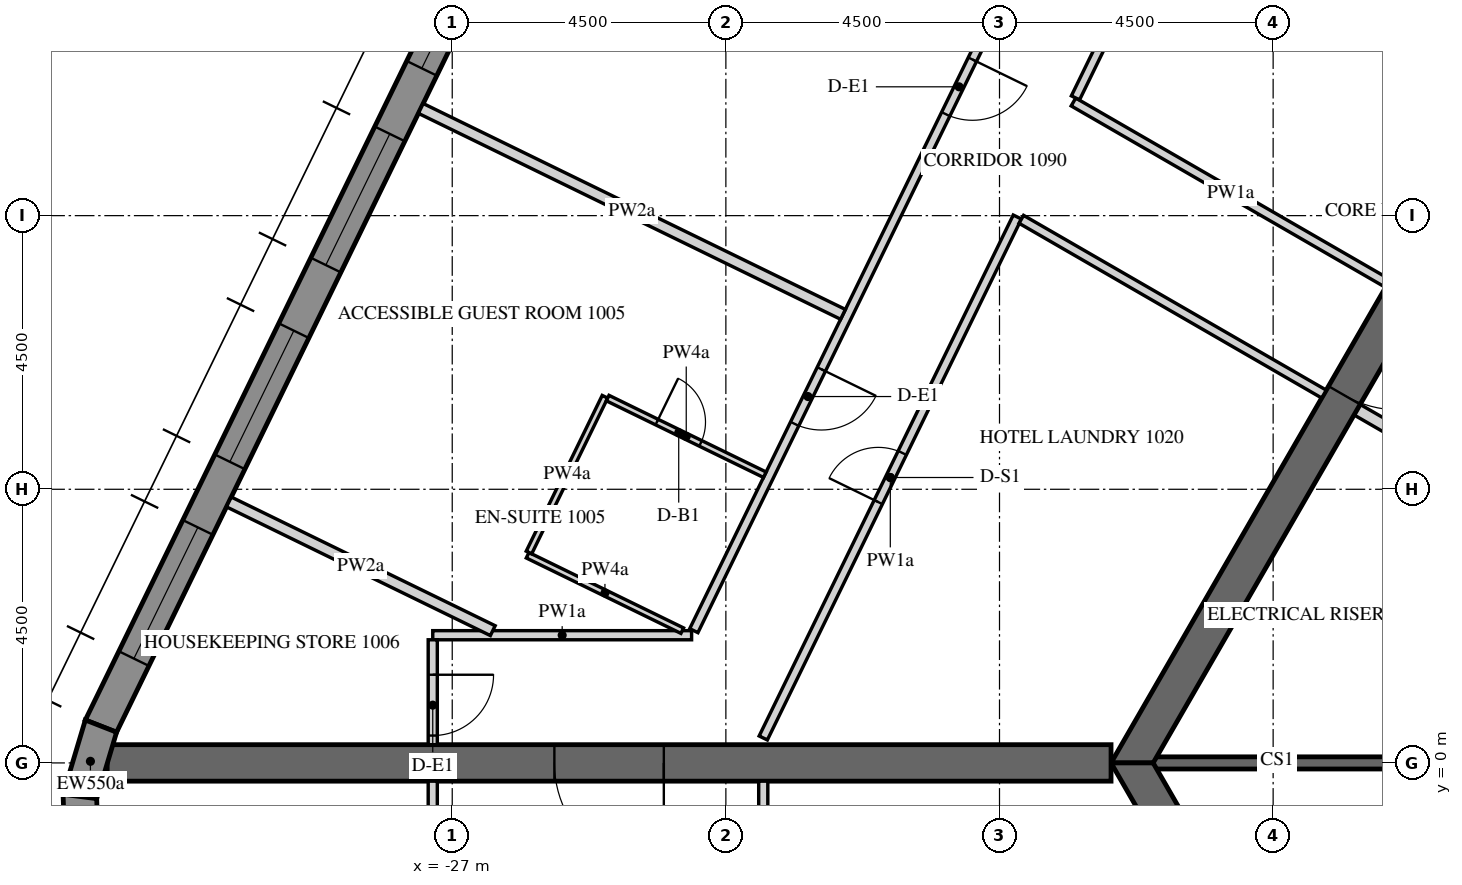
"""IFC4 building model, lengths in metres.
Left out: names, types, materials, properties, quantities, classifications, styles, units other than length and angle.
Written with IfcOpenShell. Run it as: python <this file> out.ifc"""

import sys

from ifc_helpers import new_model, si_unit, direction, frame, frame_2d, origin, place, context, subcontext, project, spatial, polyline, rectangle, outline, extrude, element, fill, save


model = new_model("IFC4")
c1 = context("Model", 3, precision=1e-05, world=origin(), true_north=direction((0.0, 1.0)))
c2 = subcontext(c1, "Body", "Model", "MODEL_VIEW")
j1 = project(units=[si_unit("LENGTHUNIT", "METRE"), si_unit("PLANEANGLEUNIT", "RADIAN")], contexts=[c1])
p1 = place(None, origin())
s1 = spatial("IfcSite", under=j1, at=p1, CompositionType="ELEMENT")
p2 = place(p1, origin())
s2 = spatial("IfcBuilding", under=s1, at=p2, CompositionType="ELEMENT")
p3 = place(p2, frame((0.0, 0.0, 142.8)))
s3 = spatial("IfcBuildingStorey", under=s2, at=p3, CompositionType="ELEMENT", Elevation=142.8)
p4 = place(p3, frame((-19.595, 27.633, -0.15), z_axis=(0.0, 0.0, 1.0), x_axis=(-0.438368285794, -0.898795441694, 0.0)))
e1 = element("IfcWall", 1, at=p4, inside=s3, PredefinedType="SOLIDWALL", context=c2, shape_type="SweptSolid", body=[
    extrude(outline(polyline([(-0.026, -0.275), (30.093, -0.275), (30.048, 0.275), (0.026, 0.275), (-0.026, -0.275)])), origin(), (0.0, 0.0, 1.0), 3.75),
])
p5 = place(p4, frame((1.236, 0.0, 1.05)))
e2 = element("IfcOpeningElement", 2, at=p5, cuts=e1, PredefinedType="OPENING", context=c2, shape_type="SweptSolid", body=[
    extrude(rectangle(XDim=2.4, YDim=2.4, at=frame_2d((1.2, 1.2))), frame((0.0, 0.285, 0.0), z_axis=(0.0, -1.0, 0.0), x_axis=(1.0, 0.0, 0.0)), (0.0, 0.0, 1.0), 0.57),
])
p6 = place(p4, frame((4.835, 0.0, 1.05)))
e3 = element("IfcOpeningElement", 3, at=p6, cuts=e1, PredefinedType="OPENING", context=c2, shape_type="SweptSolid", body=[
    extrude(rectangle(XDim=2.4, YDim=2.4, at=frame_2d((1.2, 1.2))), frame((0.0, 0.285, 0.0), z_axis=(0.0, -1.0, 0.0), x_axis=(1.0, 0.0, 0.0)), (0.0, 0.0, 1.0), 0.57),
])
p7 = place(p4, frame((8.436, 0.0, 1.05)))
e4 = element("IfcOpeningElement", 4, at=p7, cuts=e1, PredefinedType="OPENING", context=c2, shape_type="SweptSolid", body=[
    extrude(rectangle(XDim=2.4, YDim=2.4, at=frame_2d((1.2, 1.2))), frame((0.0, 0.285, 0.0), z_axis=(0.0, -1.0, 0.0), x_axis=(1.0, 0.0, 0.0)), (0.0, 0.0, 1.0), 0.57),
])
p8 = place(p4, frame((12.035, 0.0, 1.05)))
e5 = element("IfcOpeningElement", 5, at=p8, cuts=e1, PredefinedType="OPENING", context=c2, shape_type="SweptSolid", body=[
    extrude(rectangle(XDim=2.4, YDim=2.4, at=frame_2d((1.2, 1.2))), frame((0.0, 0.285, 0.0), z_axis=(0.0, -1.0, 0.0), x_axis=(1.0, 0.0, 0.0)), (0.0, 0.0, 1.0), 0.57),
])
p9 = place(p4, frame((15.635, 0.0, 1.05)))
e6 = element("IfcOpeningElement", 6, at=p9, cuts=e1, PredefinedType="OPENING", context=c2, shape_type="SweptSolid", body=[
    extrude(rectangle(XDim=2.4, YDim=2.4, at=frame_2d((1.2, 1.2))), frame((0.0, 0.285, 0.0), z_axis=(0.0, -1.0, 0.0), x_axis=(1.0, 0.0, 0.0)), (0.0, 0.0, 1.0), 0.57),
])
p10 = place(p4, frame((19.236, 0.0, 1.05)))
e7 = element("IfcOpeningElement", 7, at=p10, cuts=e1, PredefinedType="OPENING", context=c2, shape_type="SweptSolid", body=[
    extrude(rectangle(XDim=2.4, YDim=2.4, at=frame_2d((1.2, 1.2))), frame((0.0, 0.285, 0.0), z_axis=(0.0, -1.0, 0.0), x_axis=(1.0, 0.0, 0.0)), (0.0, 0.0, 1.0), 0.57),
])
p11 = place(p4, frame((22.835, 0.0, 1.05)))
e8 = element("IfcOpeningElement", 8, at=p11, cuts=e1, PredefinedType="OPENING", context=c2, shape_type="SweptSolid", body=[
    extrude(rectangle(XDim=2.4, YDim=2.4, at=frame_2d((1.2, 1.2))), frame((0.0, 0.285, 0.0), z_axis=(0.0, -1.0, 0.0), x_axis=(1.0, 0.0, 0.0)), (0.0, 0.0, 1.0), 0.57),
])
p12 = place(p4, frame((26.436, 0.0, 1.05)))
e9 = element("IfcOpeningElement", 9, at=p12, cuts=e1, PredefinedType="OPENING", context=c2, shape_type="SweptSolid", body=[
    extrude(rectangle(XDim=2.4, YDim=2.4, at=frame_2d((1.2, 1.2))), frame((0.0, 0.285, 0.0), z_axis=(0.0, -1.0, 0.0), x_axis=(1.0, 0.0, 0.0)), (0.0, 0.0, 1.0), 0.57),
])
p13 = place(p3, frame((-32.777, 0.605, -0.15), z_axis=(0.0, 0.0, 1.0), x_axis=(-0.286921497463, -0.957954098219, 0.0)))
e10 = element("IfcWall", 10, at=p13, inside=s3, PredefinedType="SOLIDWALL", context=c2, shape_type="SweptSolid", body=[
    extrude(outline(polyline([(-0.022, -0.275), (1.253, -0.275), (1.163, 0.275), (0.022, 0.275), (-0.022, -0.275)])), origin(), (0.0, 0.0, 1.0), 3.75),
])
p14 = place(p3, frame((-33.124, -0.552, -0.15), z_axis=(0.0, 0.0, 1.0), x_axis=(0.03495638276, -0.999388838893, 0.0)))
e11 = element("IfcWall", 11, at=p14, inside=s3, PredefinedType="SOLIDWALL", context=c2, shape_type="SweptSolid", body=[
    extrude(outline(polyline([(-0.045, -0.275), (1.253, -0.275), (1.163, 0.275), (0.045, 0.275), (-0.045, -0.275)])), origin(), (0.0, 0.0, 1.0), 3.75),
])
p15 = place(p3, frame((-7.91, 13.7, -0.15), z_axis=(0.0, 0.0, 1.0), x_axis=(-0.499999880136, -0.866025472988, 0.0)))
e12 = element("IfcWall", 12, at=p15, inside=s3, PredefinedType="SHEAR", context=c2, shape_type="SweptSolid", body=[
    extrude(outline(polyline([(-0.173, -0.3), (15.993, -0.3), (15.646, 0.3), (0.173, 0.3), (-0.173, -0.3)])), origin(), (0.0, 0.0, 1.0), 3.75),
])
p16 = place(p15, frame((7.039, 0.0, 0.15)))
e13 = element("IfcOpeningElement", 13, at=p16, cuts=e12, PredefinedType="OPENING", context=c2, shape_type="SweptSolid", body=[
    extrude(rectangle(XDim=1.8, YDim=2.4, at=frame_2d((0.9, 1.2))), frame((0.0, 0.31, 0.0), z_axis=(0.0, -1.0, 0.0), x_axis=(1.0, 0.0, 0.0)), (0.0, 0.0, 1.0), 0.62),
])
p17 = place(p3, frame((-15.819, 0.0, -0.15), z_axis=(0.0, 0.0, 1.0), x_axis=(0.499999880136, -0.866025472988, 0.0)))
e14 = element("IfcWall", 14, at=p17, inside=s3, PredefinedType="SHEAR", context=c2, shape_type="SweptSolid", body=[
    extrude(outline(polyline([(-0.173, -0.3), (15.993, -0.3), (15.646, 0.3), (0.173, 0.3), (-0.173, -0.3)])), origin(), (0.0, 0.0, 1.0), 3.75),
])
p18 = place(p17, frame((6.981, 0.0, 0.15)))
e15 = element("IfcOpeningElement", 15, at=p18, cuts=e14, PredefinedType="OPENING", context=c2, shape_type="SweptSolid", body=[
    extrude(rectangle(XDim=1.8, YDim=2.4, at=frame_2d((0.9, 1.2))), frame((0.0, 0.31, 0.0), z_axis=(0.0, -1.0, 0.0), x_axis=(1.0, 0.0, 0.0)), (0.0, 0.0, 1.0), 0.62),
])
p19 = place(p3, frame((-16.166, 0.0, -0.15), z_axis=(0.0, 0.0, 1.0), x_axis=(-1.0, 0.0, 0.0)))
e16 = element("IfcWall", 16, at=p19, inside=s3, PredefinedType="SHEAR", context=c2, shape_type="SweptSolid", body=[
    extrude(rectangle(XDim=16.509, YDim=0.6, at=frame_2d((8.254, 0.0))), origin(), (0.0, 0.0, 1.0), 3.75),
])
p20 = place(p19, frame((7.354, 0.0, 0.15)))
e17 = element("IfcOpeningElement", 17, at=p20, cuts=e16, PredefinedType="OPENING", context=c2, shape_type="SweptSolid", body=[
    extrude(rectangle(XDim=1.8, YDim=2.4, at=frame_2d((0.9, 1.2))), frame((0.0, 0.31, 0.0), z_axis=(0.0, -1.0, 0.0), x_axis=(1.0, 0.0, 0.0)), (0.0, 0.0, 1.0), 0.62),
])
p21 = place(p3, frame((-11.547, 0.0, -0.15), z_axis=(0.0, 0.0, 1.0), x_axis=(-1.0, 0.0, 0.0)))
e18 = element("IfcWall", 18, at=p21, inside=s3, PredefinedType="SHEAR", context=c2, shape_type="SweptSolid", body=[
    extrude(rectangle(XDim=3.926, YDim=0.2, at=frame_2d((1.963, 0.0))), origin(), (0.0, 0.0, 1.0), 3.75),
])
p22 = place(p3, frame((-9.175, 4.109, 0.0), z_axis=(0.0, 0.0, 1.0), x_axis=(-0.865989465428, 0.500062241894, 0.0)))
e19 = element("IfcWall", 19, at=p22, inside=s3, PredefinedType="PARTITIONING", context=c2, shape_type="SweptSolid", body=[
    extrude(rectangle(XDim=3.4, YDim=0.2, at=frame_2d((1.7, 0.0))), origin(), (0.0, 0.0, 1.0), 3.65),
])
p23 = place(p22, frame((1.351, 0.0, 0.0)))
e20 = element("IfcOpeningElement", 20, at=p23, cuts=e19, PredefinedType="OPENING", context=c2, shape_type="SweptSolid", body=[
    extrude(rectangle(XDim=0.9, YDim=2.1, at=frame_2d((0.45, 1.05))), frame((0.0, 0.11, 0.0), z_axis=(0.0, -1.0, 0.0), x_axis=(1.0, 0.0, 0.0)), (0.0, 0.0, 1.0), 0.22),
])
p24 = place(p3, frame((-13.565, 21.575, 0.0), z_axis=(0.0, 0.0, 1.0), x_axis=(-0.438378393111, -0.898790511996, 0.0)))
e21 = element("IfcWall", 21, at=p24, inside=s3, PredefinedType="PARTITIONING", context=c2, shape_type="SweptSolid", body=[
    extrude(rectangle(XDim=21.584, YDim=0.15, at=frame_2d((10.792, 0.0))), origin(), (0.0, 0.0, 1.0), 2.838),
])
p25 = place(p24, frame((0.775, 0.0, 0.0)))
e22 = element("IfcOpeningElement", 22, at=p25, cuts=e21, PredefinedType="OPENING", context=c2, shape_type="SweptSolid", body=[
    extrude(rectangle(XDim=1.0, YDim=2.1, at=frame_2d((0.5, 1.05))), frame((0.0, 0.085, 0.0), z_axis=(0.0, -1.0, 0.0), x_axis=(1.0, 0.0, 0.0)), (0.0, 0.0, 1.0), 0.17),
])
p26 = place(p24, frame((11.134, 0.0, 0.0)))
e23 = element("IfcOpeningElement", 23, at=p26, cuts=e21, PredefinedType="OPENING", context=c2, shape_type="SweptSolid", body=[
    extrude(rectangle(XDim=1.0, YDim=2.1, at=frame_2d((0.5, 1.05))), frame((0.0, 0.085, 0.0), z_axis=(0.0, -1.0, 0.0), x_axis=(1.0, 0.0, 0.0)), (0.0, 0.0, 1.0), 0.17),
])
p27 = place(p24, frame((16.801, 0.0, 0.0)))
e24 = element("IfcOpeningElement", 24, at=p27, cuts=e21, PredefinedType="OPENING", context=c2, shape_type="SweptSolid", body=[
    extrude(rectangle(XDim=1.0, YDim=2.1, at=frame_2d((0.5, 1.05))), frame((0.0, 0.085, 0.0), z_axis=(0.0, -1.0, 0.0), x_axis=(1.0, 0.0, 0.0)), (0.0, 0.0, 1.0), 0.17),
])
p28 = place(p3, frame((-23.063, 2.1, 0.0), z_axis=(0.0, 0.0, 1.0), x_axis=(-1.0, 0.0, 0.0)))
e25 = element("IfcWall", 25, at=p28, inside=s3, PredefinedType="PARTITIONING", context=c2, shape_type="SweptSolid", body=[
    extrude(rectangle(XDim=4.257, YDim=0.15, at=frame_2d((2.128, 0.0))), origin(), (0.0, 0.0, 1.0), 2.838),
])
p29 = place(p3, frame((-27.32, 2.025, 0.0), z_axis=(0.0, 0.0, 1.0), x_axis=(0.0, -1.0, 0.0)))
e26 = element("IfcWall", 26, at=p29, inside=s3, PredefinedType="PARTITIONING", context=c2, shape_type="SweptSolid", body=[
    extrude(rectangle(XDim=1.725, YDim=0.15, at=frame_2d((0.862, 0.0))), origin(), (0.0, 0.0, 1.0), 2.838),
])
p30 = place(p29, frame((0.575, 0.0, 0.0)))
e27 = element("IfcOpeningElement", 27, at=p30, cuts=e26, PredefinedType="OPENING", context=c2, shape_type="SweptSolid", body=[
    extrude(rectangle(XDim=1.0, YDim=2.1, at=frame_2d((0.5, 1.05))), frame((0.0, 0.085, 0.0), z_axis=(0.0, -1.0, 0.0), x_axis=(1.0, 0.0, 0.0)), (0.0, 0.0, 1.0), 0.17),
])
p31 = place(p3, frame((-11.614, 7.884, 0.0), z_axis=(0.0, 0.0, 1.0), x_axis=(-0.866017375886, 0.50001390447, 0.0)))
e28 = element("IfcWall", 28, at=p31, inside=s3, PredefinedType="PARTITIONING", context=c2, shape_type="SweptSolid", body=[
    extrude(rectangle(XDim=5.97, YDim=0.15, at=frame_2d((2.985, 0.0))), origin(), (0.0, 0.0, 1.0), 2.838),
])
p32 = place(p3, frame((-16.751, 10.937, 0.0), z_axis=(0.0, 0.0, 1.0), x_axis=(0.438378523504, 0.898790448397, 0.0)))
e29 = element("IfcWall", 29, at=p32, inside=s3, PredefinedType="PARTITIONING", context=c2, shape_type="SweptSolid", body=[
    extrude(rectangle(XDim=9.917, YDim=0.15, at=frame_2d((4.958, 0.0))), origin(), (0.0, 0.0, 1.0), 2.838),
])
p33 = place(p3, frame((-21.885, 0.41, 0.0), z_axis=(0.0, 0.0, 1.0), x_axis=(0.43837064471, 0.898794291179, 0.0)))
e30 = element("IfcWall", 30, at=p33, inside=s3, PredefinedType="PARTITIONING", context=c2, shape_type="SweptSolid", body=[
    extrude(rectangle(XDim=9.532, YDim=0.15, at=frame_2d((4.766, 0.0))), origin(), (0.0, 0.0, 1.0), 2.838),
])
p34 = place(p33, frame((4.316, 0.0, 0.0)))
e31 = element("IfcOpeningElement", 31, at=p34, cuts=e30, PredefinedType="OPENING", context=c2, shape_type="SweptSolid", body=[
    extrude(rectangle(XDim=0.9, YDim=2.1, at=frame_2d((0.45, 1.05))), frame((0.0, 0.085, 0.0), z_axis=(0.0, -1.0, 0.0), x_axis=(1.0, 0.0, 0.0)), (0.0, 0.0, 1.0), 0.17),
])
p35 = place(p3, frame((-17.642, 8.94, 0.0), z_axis=(0.0, 0.0, 1.0), x_axis=(0.866017948234, -0.500012913169, 0.0)))
e32 = element("IfcWall", 32, at=p35, inside=s3, PredefinedType="PARTITIONING", context=c2, shape_type="SweptSolid", body=[
    extrude(rectangle(XDim=5.748, YDim=0.15, at=frame_2d((2.874, 0.0))), origin(), (0.0, 0.0, 1.0), 2.838),
])
p36 = place(p3, frame((-27.32, -0.3, 0.0), z_axis=(0.0, 0.0, 1.0), x_axis=(0.0, -1.0, 0.0)))
e33 = element("IfcWall", 33, at=p36, inside=s3, PredefinedType="PARTITIONING", context=c2, shape_type="SweptSolid", body=[
    extrude(rectangle(XDim=1.8, YDim=0.15, at=frame_2d((0.9, 0.0))), origin(), (0.0, 0.0, 1.0), 2.838),
])
p37 = place(p3, frame((-21.885, -1.644, 0.0), z_axis=(0.0, 0.0, 1.0), x_axis=(0.0, 1.0, 0.0)))
e34 = element("IfcWall", 34, at=p37, inside=s3, PredefinedType="PARTITIONING", context=c2, shape_type="SweptSolid", body=[
    extrude(rectangle(XDim=1.344, YDim=0.15, at=frame_2d((0.672, 0.0))), origin(), (0.0, 0.0, 1.0), 2.838),
])
p38 = place(p3, frame((-27.517, 10.763, 0.0), z_axis=(0.0, 0.0, 1.0), x_axis=(0.898789402655, -0.438380667542, 0.0)))
e35 = element("IfcWall", 35, at=p38, inside=s3, PredefinedType="PARTITIONING", context=c2, shape_type="SweptSolid", body=[
    extrude(rectangle(XDim=7.725, YDim=0.18, at=frame_2d((3.862, 0.0))), origin(), (0.0, 0.0, 1.0), 2.838),
])
p39 = place(p3, frame((-23.217, 2.175, 0.0), z_axis=(0.0, 0.0, 1.0), x_axis=(-0.89881903386, 0.438319910991, 0.0)))
e36 = element("IfcWall", 36, at=p39, inside=s3, PredefinedType="PARTITIONING", context=c2, shape_type="SweptSolid", body=[
    extrude(rectangle(XDim=2.829, YDim=0.1, at=frame_2d((1.415, 0.0))), origin(), (0.0, 0.0, 1.0), 2.838),
])
p40 = place(p3, frame((-25.738, 3.46, 0.0), z_axis=(0.0, 0.0, 1.0), x_axis=(0.438317306369, 0.898820304031, 0.0)))
e37 = element("IfcWall", 37, at=p40, inside=s3, PredefinedType="PARTITIONING", context=c2, shape_type="SweptSolid", body=[
    extrude(rectangle(XDim=2.85, YDim=0.1, at=frame_2d((1.425, 0.0))), origin(), (0.0, 0.0, 1.0), 2.838),
])
p41 = place(p3, frame((-24.444, 6.0, 0.0), z_axis=(0.0, 0.0, 1.0), x_axis=(0.898782318197, -0.438395192145, 0.0)))
e38 = element("IfcWall", 38, at=p41, inside=s3, PredefinedType="PARTITIONING", context=c2, shape_type="SweptSolid", body=[
    extrude(rectangle(XDim=2.875, YDim=0.1, at=frame_2d((1.438, 0.0))), origin(), (0.0, 0.0, 1.0), 2.838),
])
p42 = place(p41, frame((0.9, 0.0, 0.0)))
e39 = element("IfcOpeningElement", 39, at=p42, cuts=e38, PredefinedType="OPENING", context=c2, shape_type="SweptSolid", body=[
    extrude(rectangle(XDim=0.8, YDim=2.1, at=frame_2d((0.4, 1.05))), frame((0.0, 0.06, 0.0), z_axis=(0.0, -1.0, 0.0), x_axis=(1.0, 0.0, 0.0)), (0.0, 0.0, 1.0), 0.12),
])
p43 = place(p3, frame((-30.673, 4.292, 0.0), z_axis=(0.0, 0.0, 1.0), x_axis=(0.898812662672, -0.438332975512, 0.0)))
e40 = element("IfcWall", 40, at=p43, inside=s3, PredefinedType="PARTITIONING", context=c2, shape_type="SweptSolid", body=[
    extrude(rectangle(XDim=4.828, YDim=0.18, at=frame_2d((2.414, 0.0))), origin(), (0.0, 0.0, 1.0), 2.838),
])
p44 = place(p9, frame((0.0, 0.205, 0.0)))
e41 = element("IfcWindow", 41, at=p44, inside=s3, PartitioningType="DOUBLE_PANEL_VERTICAL", PredefinedType="WINDOW", context=c2, shape_type="SweptSolid", body=[
    extrude(rectangle(XDim=2.4, YDim=2.4, at=frame_2d((1.2, 1.2))), frame((0.0, 0.03, 0.0), z_axis=(0.0, -1.0, 0.0), x_axis=(1.0, 0.0, 0.0)), (0.0, 0.0, 1.0), 0.06),
])
fill(e6, e41)
p45 = place(p10, frame((0.0, 0.205, 0.0)))
e42 = element("IfcWindow", 42, at=p45, inside=s3, PartitioningType="DOUBLE_PANEL_VERTICAL", PredefinedType="WINDOW", context=c2, shape_type="SweptSolid", body=[
    extrude(rectangle(XDim=2.4, YDim=2.4, at=frame_2d((1.2, 1.2))), frame((0.0, 0.03, 0.0), z_axis=(0.0, -1.0, 0.0), x_axis=(1.0, 0.0, 0.0)), (0.0, 0.0, 1.0), 0.06),
])
fill(e7, e42)
p46 = place(p11, frame((0.0, 0.205, 0.0)))
e43 = element("IfcWindow", 43, at=p46, inside=s3, PartitioningType="DOUBLE_PANEL_VERTICAL", PredefinedType="WINDOW", context=c2, shape_type="SweptSolid", body=[
    extrude(rectangle(XDim=2.4, YDim=2.4, at=frame_2d((1.2, 1.2))), frame((0.0, 0.03, 0.0), z_axis=(0.0, -1.0, 0.0), x_axis=(1.0, 0.0, 0.0)), (0.0, 0.0, 1.0), 0.06),
])
fill(e8, e43)
p47 = place(p12, frame((0.0, 0.205, 0.0)))
e44 = element("IfcWindow", 44, at=p47, inside=s3, PartitioningType="DOUBLE_PANEL_VERTICAL", PredefinedType="WINDOW", context=c2, shape_type="SweptSolid", body=[
    extrude(rectangle(XDim=2.4, YDim=2.4, at=frame_2d((1.2, 1.2))), frame((0.0, 0.03, 0.0), z_axis=(0.0, -1.0, 0.0), x_axis=(1.0, 0.0, 0.0)), (0.0, 0.0, 1.0), 0.06),
])
fill(e9, e44)
p48 = place(p16, origin())
e45 = element("IfcDoor", 45, at=p48, inside=s3, OperationType="DOUBLE_DOOR_SINGLE_SWING", PredefinedType="DOOR", context=c2, shape_type="SweptSolid", body=[
    extrude(rectangle(XDim=1.8, YDim=2.4, at=frame_2d((0.9, 1.2))), frame((0.0, 0.025, 0.0), z_axis=(0.0, -1.0, 0.0), x_axis=(1.0, 0.0, 0.0)), (0.0, 0.0, 1.0), 0.05),
])
fill(e13, e45)
p49 = place(p20, origin())
e46 = element("IfcDoor", 46, at=p49, inside=s3, OperationType="DOUBLE_DOOR_SINGLE_SWING", PredefinedType="DOOR", context=c2, shape_type="SweptSolid", body=[
    extrude(rectangle(XDim=1.8, YDim=2.4, at=frame_2d((0.9, 1.2))), frame((0.0, 0.025, 0.0), z_axis=(0.0, -1.0, 0.0), x_axis=(1.0, 0.0, 0.0)), (0.0, 0.0, 1.0), 0.05),
])
fill(e17, e46)
p50 = place(p26, origin())
e47 = element("IfcDoor", 47, at=p50, inside=s3, OperationType="SINGLE_SWING_LEFT", PredefinedType="DOOR", context=c2, shape_type="SweptSolid", body=[
    extrude(rectangle(XDim=1.0, YDim=2.1, at=frame_2d((0.5, 1.05))), frame((0.0, 0.025, 0.0), z_axis=(0.0, -1.0, 0.0), x_axis=(1.0, 0.0, 0.0)), (0.0, 0.0, 1.0), 0.05),
])
fill(e23, e47)
p51 = place(p27, origin())
e48 = element("IfcDoor", 48, at=p51, inside=s3, OperationType="SINGLE_SWING_RIGHT", PredefinedType="DOOR", context=c2, shape_type="SweptSolid", body=[
    extrude(rectangle(XDim=1.0, YDim=2.1, at=frame_2d((0.5, 1.05))), frame((0.0, 0.025, 0.0), z_axis=(0.0, -1.0, 0.0), x_axis=(1.0, 0.0, 0.0)), (0.0, 0.0, 1.0), 0.05),
])
fill(e24, e48)
p52 = place(p42, origin())
e49 = element("IfcDoor", 49, at=p52, inside=s3, OperationType="SINGLE_SWING_RIGHT", PredefinedType="DOOR", context=c2, shape_type="SweptSolid", body=[
    extrude(rectangle(XDim=0.8, YDim=2.1, at=frame_2d((0.4, 1.05))), frame((0.0, 0.025, 0.0), z_axis=(0.0, -1.0, 0.0), x_axis=(1.0, 0.0, 0.0)), (0.0, 0.0, 1.0), 0.05),
])
fill(e39, e49)
p53 = place(p30, origin())
e50 = element("IfcDoor", 50, at=p53, inside=s3, OperationType="SINGLE_SWING_LEFT", PredefinedType="DOOR", context=c2, shape_type="SweptSolid", body=[
    extrude(rectangle(XDim=1.0, YDim=2.1, at=frame_2d((0.5, 1.05))), frame((0.0, 0.025, 0.0), z_axis=(0.0, -1.0, 0.0), x_axis=(1.0, 0.0, 0.0)), (0.0, 0.0, 1.0), 0.05),
])
fill(e27, e50)
p54 = place(p34, origin())
e51 = element("IfcDoor", 51, at=p54, inside=s3, OperationType="SINGLE_SWING_RIGHT", PredefinedType="DOOR", context=c2, shape_type="SweptSolid", body=[
    extrude(rectangle(XDim=0.9, YDim=2.1, at=frame_2d((0.45, 1.05))), frame((0.0, 0.025, 0.0), z_axis=(0.0, -1.0, 0.0), x_axis=(1.0, 0.0, 0.0)), (0.0, 0.0, 1.0), 0.05),
])
fill(e31, e51)
save(model, sys.argv[1])
